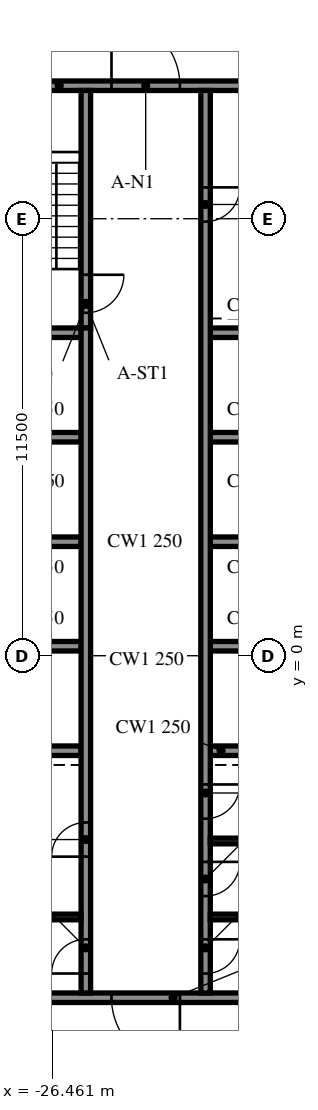
"""IFC4 building model, lengths in metres.
Left out: names, types, materials, properties, quantities, classifications, styles, units other than length and angle.
Written with IfcOpenShell. Run it as: python <this file> out.ifc"""

import sys

from ifc_helpers import new_model, si_unit, direction, frame, frame_2d, origin, place, context, subcontext, project, spatial, rectangle, extrude, element, fill, save


model = new_model("IFC4")
c1 = context("Model", 3, precision=1e-05, world=origin(), true_north=direction((0.0, 1.0)))
c2 = subcontext(c1, "Body", "Model", "MODEL_VIEW")
j1 = project(units=[si_unit("LENGTHUNIT", "METRE"), si_unit("PLANEANGLEUNIT", "RADIAN")], contexts=[c1])
p1 = place(None, origin())
s1 = spatial("IfcSite", under=j1, at=p1, CompositionType="ELEMENT")
p2 = place(p1, origin())
s2 = spatial("IfcBuilding", under=s1, at=p2, CompositionType="ELEMENT")
p3 = place(p2, frame((0.0, 0.0, 159.2)))
s3 = spatial("IfcBuildingStorey", under=s2, at=p3, CompositionType="ELEMENT", Elevation=159.2)
p4 = place(p3, frame((-19.45, -9.0, 0.0), z_axis=(0.0, 0.0, 1.0), x_axis=(-1.0, 0.0, 0.0)))
e1 = element("IfcWall", 1, at=p4, inside=s3, PredefinedType="SOLIDWALL", context=c2, shape_type="SweptSolid", body=[
    extrude(rectangle(XDim=9.1, YDim=0.25, at=frame_2d((4.55, 0.0))), origin(), (0.0, 0.0, 1.0), 3.46),
])
p5 = place(p4, frame((3.65, 0.0, 0.0)))
e2 = element("IfcOpeningElement", 2, at=p5, cuts=e1, PredefinedType="OPENING", context=c2, shape_type="SweptSolid", body=[
    extrude(rectangle(XDim=1.8, YDim=2.1, at=frame_2d((0.9, 1.05))), frame((0.0, 0.135, 0.0), z_axis=(0.0, -1.0, 0.0), x_axis=(1.0, 0.0, 0.0)), (0.0, 0.0, 1.0), 0.27),
])
p6 = place(p3, frame((-28.55, 15.0, 0.0), z_axis=(0.0, 0.0, 1.0), x_axis=(1.0, 0.0, 0.0)))
e3 = element("IfcWall", 3, at=p6, inside=s3, PredefinedType="SOLIDWALL", context=c2, shape_type="SweptSolid", body=[
    extrude(rectangle(XDim=9.1, YDim=0.25, at=frame_2d((4.55, 0.0))), origin(), (0.0, 0.0, 1.0), 3.46),
])
p7 = place(p6, frame((3.65, 0.0, 0.0)))
e4 = element("IfcOpeningElement", 4, at=p7, cuts=e3, PredefinedType="OPENING", context=c2, shape_type="SweptSolid", body=[
    extrude(rectangle(XDim=1.8, YDim=2.1, at=frame_2d((0.9, 1.05))), frame((0.0, 0.135, 0.0), z_axis=(0.0, -1.0, 0.0), x_axis=(1.0, 0.0, 0.0)), (0.0, 0.0, 1.0), 0.27),
])
p8 = place(p3, frame((-25.575, -8.875, 0.0), z_axis=(0.0, 0.0, 1.0), x_axis=(0.0, 1.0, 0.0)))
e5 = element("IfcWall", 5, at=p8, inside=s3, PredefinedType="SOLIDWALL", context=c2, shape_type="SweptSolid", body=[
    extrude(rectangle(XDim=17.5, YDim=0.25, at=frame_2d((8.75, 0.0))), origin(), (0.0, 0.0, 1.0), 3.46),
])
p9 = place(p8, frame((0.512, 0.0, 0.0)))
e6 = element("IfcOpeningElement", 6, at=p9, cuts=e5, PredefinedType="OPENING", context=c2, shape_type="SweptSolid", body=[
    extrude(rectangle(XDim=0.9, YDim=2.1, at=frame_2d((0.45, 1.05))), frame((0.0, 0.135, 0.0), z_axis=(0.0, -1.0, 0.0), x_axis=(1.0, 0.0, 0.0)), (0.0, 0.0, 1.0), 0.27),
])
p10 = place(p8, frame((3.587, 0.0, 0.0)))
e7 = element("IfcOpeningElement", 7, at=p10, cuts=e5, PredefinedType="OPENING", context=c2, shape_type="SweptSolid", body=[
    extrude(rectangle(XDim=0.9, YDim=2.1, at=frame_2d((0.45, 1.05))), frame((0.0, 0.135, 0.0), z_axis=(0.0, -1.0, 0.0), x_axis=(1.0, 0.0, 0.0)), (0.0, 0.0, 1.0), 0.27),
])
p11 = place(p3, frame((-25.575, 14.875, 0.0), z_axis=(0.0, 0.0, 1.0), x_axis=(0.0, -1.0, 0.0)))
e8 = element("IfcWall", 8, at=p11, inside=s3, PredefinedType="SOLIDWALL", context=c2, shape_type="SweptSolid", body=[
    extrude(rectangle(XDim=6.25, YDim=0.25, at=frame_2d((3.125, 0.0))), origin(), (0.0, 0.0, 1.0), 3.46),
])
p12 = place(p11, frame((4.85, 0.0, 0.0)))
e9 = element("IfcOpeningElement", 9, at=p12, cuts=e8, PredefinedType="OPENING", context=c2, shape_type="SweptSolid", body=[
    extrude(rectangle(XDim=1.0, YDim=2.1, at=frame_2d((0.5, 1.05))), frame((0.0, 0.135, 0.0), z_axis=(0.0, -1.0, 0.0), x_axis=(1.0, 0.0, 0.0)), (0.0, 0.0, 1.0), 0.27),
])
p13 = place(p3, frame((-22.425, 14.875, 0.0), z_axis=(0.0, 0.0, 1.0), x_axis=(0.0, -1.0, 0.0)))
e10 = element("IfcWall", 10, at=p13, inside=s3, PredefinedType="SOLIDWALL", context=c2, shape_type="SweptSolid", body=[
    extrude(rectangle(XDim=23.75, YDim=0.25, at=frame_2d((11.875, 0.0))), origin(), (0.0, 0.0, 1.0), 3.46),
])
p14 = place(p13, frame((22.337, 0.0, 0.0)))
e11 = element("IfcOpeningElement", 11, at=p14, cuts=e10, PredefinedType="OPENING", context=c2, shape_type="SweptSolid", body=[
    extrude(rectangle(XDim=0.9, YDim=2.1, at=frame_2d((0.45, 1.05))), frame((0.0, 0.135, 0.0), z_axis=(0.0, -1.0, 0.0), x_axis=(1.0, 0.0, 0.0)), (0.0, 0.0, 1.0), 0.27),
])
p15 = place(p13, frame((20.3, 0.0, 0.0)))
e12 = element("IfcOpeningElement", 12, at=p15, cuts=e10, PredefinedType="OPENING", context=c2, shape_type="SweptSolid", body=[
    extrude(rectangle(XDim=0.9, YDim=2.1, at=frame_2d((0.45, 1.05))), frame((0.0, 0.135, 0.0), z_axis=(0.0, -1.0, 0.0), x_axis=(1.0, 0.0, 0.0)), (0.0, 0.0, 1.0), 0.27),
])
p16 = place(p13, frame((18.262, 0.0, 0.0)))
e13 = element("IfcOpeningElement", 13, at=p16, cuts=e10, PredefinedType="OPENING", context=c2, shape_type="SweptSolid", body=[
    extrude(rectangle(XDim=0.9, YDim=2.1, at=frame_2d((0.45, 1.05))), frame((0.0, 0.135, 0.0), z_axis=(0.0, -1.0, 0.0), x_axis=(1.0, 0.0, 0.0)), (0.0, 0.0, 1.0), 0.27),
])
p17 = place(p13, frame((2.55, 0.0, 0.0)))
e14 = element("IfcOpeningElement", 14, at=p17, cuts=e10, PredefinedType="OPENING", context=c2, shape_type="SweptSolid", body=[
    extrude(rectangle(XDim=0.9, YDim=2.1, at=frame_2d((0.45, 1.05))), frame((0.0, 0.135, 0.0), z_axis=(0.0, -1.0, 0.0), x_axis=(1.0, 0.0, 0.0)), (0.0, 0.0, 1.0), 0.27),
])
for number, where, z_axis, x_axis in (
    (15, (-28.55, -2.5, 0.0), (0.0, 0.0, 1.0), (1.0, 0.0, 0.0)),
    (16, (-28.55, 0.25, 0.0), (0.0, 0.0, 1.0), (1.0, 0.0, 0.0)),
    (17, (-28.55, 3.0, 0.0), (0.0, 0.0, 1.0), (1.0, 0.0, 0.0)),
    (18, (-28.55, 5.75, 0.0), (0.0, 0.0, 1.0), (1.0, 0.0, 0.0)),
    (19, (-28.55, 8.5, 0.0), (0.0, 0.0, 1.0), (1.0, 0.0, 0.0)),
    (20, (-22.3, -2.5, 0.0), (0.0, 0.0, 1.0), (1.0, 0.0, 0.0)),
    (21, (-22.3, 0.25, 0.0), (0.0, 0.0, 1.0), (1.0, 0.0, 0.0)),
    (22, (-22.3, 3.0, 0.0), (0.0, 0.0, 1.0), (1.0, 0.0, 0.0)),
    (23, (-22.3, 5.75, 0.0), (0.0, 0.0, 1.0), (1.0, 0.0, 0.0)),
    (24, (-22.3, 8.5, 0.0), (0.0, 0.0, 1.0), (1.0, 0.0, 0.0)),
):
    element("IfcWall", number, at=place(p3, frame(where, z_axis=z_axis, x_axis=x_axis)), inside=s3, PredefinedType="SOLIDWALL", context=c2, shape_type="SweptSolid", body=[
        extrude(rectangle(XDim=2.85, YDim=0.25, at=frame_2d((1.425, 0.0))), origin(), (0.0, 0.0, 1.0), 3.46),
    ])
for number, where, z_axis, x_axis in (
    (25, (-28.55, -6.875, 0.0), (0.0, 0.0, 1.0), (1.0, 0.0, 0.0)),
    (26, (-22.3, -6.875, 0.0), (0.0, 0.0, 1.0), (1.0, 0.0, 0.0)),
    (27, (-22.3, -4.875, 0.0), (0.0, 0.0, 1.0), (1.0, 0.0, 0.0)),
):
    element("IfcWall", number, at=place(p3, frame(where, z_axis=z_axis, x_axis=x_axis)), inside=s3, PredefinedType="PARTITIONING", context=c2, shape_type="SweptSolid", body=[
        extrude(rectangle(XDim=2.85, YDim=0.15, at=frame_2d((1.425, 0.0))), origin(), (0.0, 0.0, 1.0), 3.46),
    ])
p18 = place(p5, origin())
e28 = element("IfcDoor", 28, at=p18, inside=s3, OperationType="DOUBLE_DOOR_SINGLE_SWING", PredefinedType="DOOR", context=c2, shape_type="SweptSolid", body=[
    extrude(rectangle(XDim=1.8, YDim=2.1, at=frame_2d((0.9, 1.05))), frame((0.0, 0.025, 0.0), z_axis=(0.0, -1.0, 0.0), x_axis=(1.0, 0.0, 0.0)), (0.0, 0.0, 1.0), 0.05),
])
fill(e2, e28)
p19 = place(p7, origin())
e29 = element("IfcDoor", 29, at=p19, inside=s3, OperationType="DOUBLE_DOOR_SINGLE_SWING", PredefinedType="DOOR", context=c2, shape_type="SweptSolid", body=[
    extrude(rectangle(XDim=1.8, YDim=2.1, at=frame_2d((0.9, 1.05))), frame((0.0, 0.025, 0.0), z_axis=(0.0, -1.0, 0.0), x_axis=(1.0, 0.0, 0.0)), (0.0, 0.0, 1.0), 0.05),
])
fill(e4, e29)
p20 = place(p9, origin())
e30 = element("IfcDoor", 30, at=p20, inside=s3, OperationType="SINGLE_SWING_LEFT", PredefinedType="DOOR", context=c2, shape_type="SweptSolid", body=[
    extrude(rectangle(XDim=0.9, YDim=2.1, at=frame_2d((0.45, 1.05))), frame((0.0, 0.025, 0.0), z_axis=(0.0, -1.0, 0.0), x_axis=(1.0, 0.0, 0.0)), (0.0, 0.0, 1.0), 0.05),
])
fill(e6, e30)
p21 = place(p10, origin())
e31 = element("IfcDoor", 31, at=p21, inside=s3, OperationType="SINGLE_SWING_RIGHT", PredefinedType="DOOR", context=c2, shape_type="SweptSolid", body=[
    extrude(rectangle(XDim=0.9, YDim=2.1, at=frame_2d((0.45, 1.05))), frame((0.0, 0.025, 0.0), z_axis=(0.0, -1.0, 0.0), x_axis=(1.0, 0.0, 0.0)), (0.0, 0.0, 1.0), 0.05),
])
fill(e7, e31)
p22 = place(p14, origin())
e32 = element("IfcDoor", 32, at=p22, inside=s3, OperationType="SINGLE_SWING_LEFT", PredefinedType="DOOR", context=c2, shape_type="SweptSolid", body=[
    extrude(rectangle(XDim=0.9, YDim=2.1, at=frame_2d((0.45, 1.05))), frame((0.0, 0.025, 0.0), z_axis=(0.0, -1.0, 0.0), x_axis=(1.0, 0.0, 0.0)), (0.0, 0.0, 1.0), 0.05),
])
fill(e11, e32)
p23 = place(p15, origin())
e33 = element("IfcDoor", 33, at=p23, inside=s3, OperationType="SINGLE_SWING_RIGHT", PredefinedType="DOOR", context=c2, shape_type="SweptSolid", body=[
    extrude(rectangle(XDim=0.9, YDim=2.1, at=frame_2d((0.45, 1.05))), frame((0.0, 0.025, 0.0), z_axis=(0.0, -1.0, 0.0), x_axis=(1.0, 0.0, 0.0)), (0.0, 0.0, 1.0), 0.05),
])
fill(e12, e33)
p24 = place(p16, origin())
e34 = element("IfcDoor", 34, at=p24, inside=s3, OperationType="SINGLE_SWING_LEFT", PredefinedType="DOOR", context=c2, shape_type="SweptSolid", body=[
    extrude(rectangle(XDim=0.9, YDim=2.1, at=frame_2d((0.45, 1.05))), frame((0.0, 0.025, 0.0), z_axis=(0.0, -1.0, 0.0), x_axis=(1.0, 0.0, 0.0)), (0.0, 0.0, 1.0), 0.05),
])
fill(e13, e34)
p25 = place(p17, origin())
e35 = element("IfcDoor", 35, at=p25, inside=s3, OperationType="SINGLE_SWING_RIGHT", PredefinedType="DOOR", context=c2, shape_type="SweptSolid", body=[
    extrude(rectangle(XDim=0.9, YDim=2.1, at=frame_2d((0.45, 1.05))), frame((0.0, 0.025, 0.0), z_axis=(0.0, -1.0, 0.0), x_axis=(1.0, 0.0, 0.0)), (0.0, 0.0, 1.0), 0.05),
])
fill(e14, e35)
p26 = place(p12, origin())
e36 = element("IfcDoor", 36, at=p26, inside=s3, OperationType="SINGLE_SWING_LEFT", PredefinedType="DOOR", context=c2, shape_type="SweptSolid", body=[
    extrude(rectangle(XDim=1.0, YDim=2.1, at=frame_2d((0.5, 1.05))), frame((0.0, 0.025, 0.0), z_axis=(0.0, -1.0, 0.0), x_axis=(1.0, 0.0, 0.0)), (0.0, 0.0, 1.0), 0.05),
])
fill(e9, e36)
save(model, sys.argv[1])
